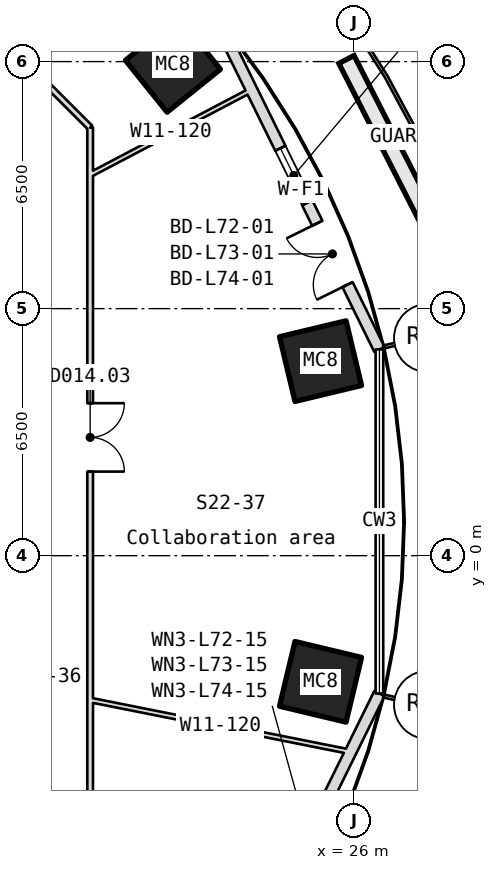
"""IFC4 building model, lengths in metres.
Left out: names, types, materials, properties, quantities, classifications, styles, units other than length and angle.
Written with IfcOpenShell. Run it as: python <this file> out.ifc"""

import sys

from ifc_helpers import new_model, si_unit, direction, frame, frame_2d, origin, origin_2d, place, context, subcontext, project, spatial, rectangle, hollow_rectangle, extrude, element, fill, save


model = new_model("IFC4")
c1 = context("Model", 3, precision=1e-05, world=origin(), true_north=direction((0.0, 1.0)))
c2 = subcontext(c1, "Body", "Model", "MODEL_VIEW")
j1 = project(units=[si_unit("LENGTHUNIT", "METRE"), si_unit("PLANEANGLEUNIT", "RADIAN")], contexts=[c1])
p1 = place(None, origin())
s1 = spatial("IfcSite", under=j1, at=p1, CompositionType="ELEMENT")
p2 = place(p1, origin())
s2 = spatial("IfcBuilding", under=s1, at=p2, CompositionType="ELEMENT")
p3 = place(p2, frame((0.0, 0.0, 321.85)))
s3 = spatial("IfcBuildingStorey", under=s2, at=p3, CompositionType="ELEMENT", Elevation=321.85)
for number, where, z_axis, x_axis in (
    (1, (25.112, 5.119, -0.18), (0.0, 0.0, 1.0), (0.233, -0.973, 0.0)),
    (2, (21.228, 12.915, -0.18), (0.0, 0.0, 1.0), (0.626, -0.779, 0.0)),
    (3, (25.112, -3.319, -0.18), (0.0, 0.0, 1.0), (-0.233, -0.973, 0.0)),
):
    element("IfcColumn", number, at=place(p3, frame(where, z_axis=z_axis, x_axis=x_axis)), inside=s3, PredefinedType="COLUMN", context=c2, shape_type="SweptSolid", body=[
        extrude(hollow_rectangle(XDim=1.75, YDim=1.8, WallThickness=0.055, at=origin_2d()), origin(), (0.0, 0.0, 1.0), 4.15),
    ])
p4 = place(p3, frame((26.662, 5.427, 0.0), z_axis=(0.0, 0.0, 1.0), x_axis=(-0.441801707928, 0.897112730303, 0.0)))
e4 = element("IfcWall", 4, at=p4, inside=s3, PredefinedType="SOLIDWALL", context=c2, shape_type="SweptSolid", body=[
    extrude(rectangle(XDim=9.325, YDim=0.3, at=frame_2d((4.663, 0.0))), origin(), (0.0, 0.0, 1.0), 3.97),
])
p5 = place(p4, frame((1.9, 0.0, 0.0)))
e5 = element("IfcOpeningElement", 5, at=p5, cuts=e4, PredefinedType="OPENING", context=c2, shape_type="SweptSolid", body=[
    extrude(rectangle(XDim=1.8, YDim=2.4, at=frame_2d((0.9, 1.2))), frame((0.0, 0.16, 0.0), z_axis=(0.0, -1.0, 0.0), x_axis=(1.0, 0.0, 0.0)), (0.0, 0.0, 1.0), 0.32),
])
p6 = place(p4, frame((4.3, 0.0, 0.9)))
e6 = element("IfcOpeningElement", 6, at=p6, cuts=e4, PredefinedType="OPENING", context=c2, shape_type="SweptSolid", body=[
    extrude(rectangle(XDim=1.6, YDim=1.5, at=frame_2d((0.8, 0.75))), frame((0.0, 0.16, 0.0), z_axis=(0.0, -1.0, 0.0), x_axis=(1.0, 0.0, 0.0)), (0.0, 0.0, 1.0), 0.32),
])
p7 = place(p3, frame((22.542, -11.993, 0.0), z_axis=(0.0, 0.0, 1.0), x_axis=(0.441801707928, 0.897112730303, 0.0)))
e7 = element("IfcWall", 7, at=p7, inside=s3, PredefinedType="SOLIDWALL", context=c2, shape_type="SweptSolid", body=[
    extrude(rectangle(XDim=9.325, YDim=0.3, at=frame_2d((4.663, 0.0))), origin(), (0.0, 0.0, 1.0), 3.97),
])
p8 = place(p7, frame((1.9, 0.0, 0.0)))
e8 = element("IfcOpeningElement", 8, at=p8, cuts=e7, PredefinedType="OPENING", context=c2, shape_type="SweptSolid", body=[
    extrude(rectangle(XDim=1.8, YDim=2.4, at=frame_2d((0.9, 1.2))), frame((0.0, 0.16, 0.0), z_axis=(0.0, -1.0, 0.0), x_axis=(1.0, 0.0, 0.0)), (0.0, 0.0, 1.0), 0.32),
])
p9 = place(p7, frame((4.3, 0.0, 0.9)))
e9 = element("IfcOpeningElement", 9, at=p9, cuts=e7, PredefinedType="OPENING", context=c2, shape_type="SweptSolid", body=[
    extrude(rectangle(XDim=1.6, YDim=1.5, at=frame_2d((0.8, 0.75))), frame((0.0, 0.16, 0.0), z_axis=(0.0, -1.0, 0.0), x_axis=(1.0, 0.0, 0.0)), (0.0, 0.0, 1.0), 0.32),
])
p10 = place(p3, frame((14.263, 16.05, 0.0), z_axis=(0.0, 0.0, 1.0), x_axis=(0.707106781187, -0.707106781187, 0.0)))
e10 = element("IfcWall", 10, at=p10, inside=s3, PredefinedType="PARTITIONING", context=c2, shape_type="SweptSolid", body=[
    extrude(rectangle(XDim=6.769, YDim=0.15, at=frame_2d((3.385, 0.0))), origin(), (0.0, 0.0, 1.0), 3.97),
])
p11 = place(p3, frame((19.05, -3.797, 0.0), z_axis=(0.0, 0.0, 1.0), x_axis=(0.980706745877, -0.195484727258, 0.0)))
e11 = element("IfcWall", 11, at=p11, inside=s3, PredefinedType="PARTITIONING", context=c2, shape_type="SweptSolid", body=[
    extrude(rectangle(XDim=6.99, YDim=0.12, at=frame_2d((3.495, 0.0))), origin(), (0.0, 0.0, 1.0), 3.97),
])
p12 = place(p3, frame((19.05, 10.022, 0.0), z_axis=(0.0, 0.0, 1.0), x_axis=(0.885000946398, 0.465589223323, 0.0)))
e12 = element("IfcWall", 12, at=p12, inside=s3, PredefinedType="PARTITIONING", context=c2, shape_type="SweptSolid", body=[
    extrude(rectangle(XDim=4.801, YDim=0.12, at=frame_2d((2.4, 0.0))), origin(), (0.0, 0.0, 1.0), 3.97),
])
p13 = place(p3, frame((19.05, 11.263, 0.0), z_axis=(0.0, 0.0, 1.0), x_axis=(0.0, -1.0, 0.0)))
e13 = element("IfcWall", 13, at=p13, inside=s3, PredefinedType="PARTITIONING", context=c2, shape_type="SweptSolid", body=[
    extrude(rectangle(XDim=22.527, YDim=0.15, at=frame_2d((11.263, 0.0))), origin(), (0.0, 0.0, 1.0), 3.97),
])
p14 = place(p13, frame((7.251, 0.0, 0.0)))
e14 = element("IfcOpeningElement", 14, at=p14, cuts=e13, PredefinedType="OPENING", context=c2, shape_type="SweptSolid", body=[
    extrude(rectangle(XDim=1.8, YDim=2.1, at=frame_2d((0.9, 1.05))), frame((0.0, 0.085, 0.0), z_axis=(0.0, -1.0, 0.0), x_axis=(1.0, 0.0, 0.0)), (0.0, 0.0, 1.0), 0.17),
])
p15 = place(p5, origin())
e15 = element("IfcDoor", 15, at=p15, inside=s3, OperationType="SINGLE_SWING_LEFT", PredefinedType="DOOR", context=c2, shape_type="SweptSolid", body=[
    extrude(rectangle(XDim=1.8, YDim=2.4, at=frame_2d((0.9, 1.2))), frame((0.0, 0.025, 0.0), z_axis=(0.0, -1.0, 0.0), x_axis=(1.0, 0.0, 0.0)), (0.0, 0.0, 1.0), 0.05),
])
fill(e5, e15)
p16 = place(p6, origin())
e16 = element("IfcWindow", 16, at=p16, inside=s3, PartitioningType="SINGLE_PANEL", PredefinedType="WINDOW", context=c2, shape_type="SweptSolid", body=[
    extrude(rectangle(XDim=1.6, YDim=1.5, at=frame_2d((0.8, 0.75))), frame((0.0, 0.03, 0.0), z_axis=(0.0, -1.0, 0.0), x_axis=(1.0, 0.0, 0.0)), (0.0, 0.0, 1.0), 0.06),
])
fill(e6, e16)
p17 = place(p14, origin())
e17 = element("IfcDoor", 17, at=p17, inside=s3, OperationType="DOUBLE_DOOR_SINGLE_SWING", PredefinedType="DOOR", context=c2, shape_type="SweptSolid", body=[
    extrude(rectangle(XDim=1.8, YDim=2.1, at=frame_2d((0.9, 1.05))), frame((0.0, 0.025, 0.0), z_axis=(0.0, -1.0, 0.0), x_axis=(1.0, 0.0, 0.0)), (0.0, 0.0, 1.0), 0.05),
])
fill(e14, e17)
save(model, sys.argv[1])
